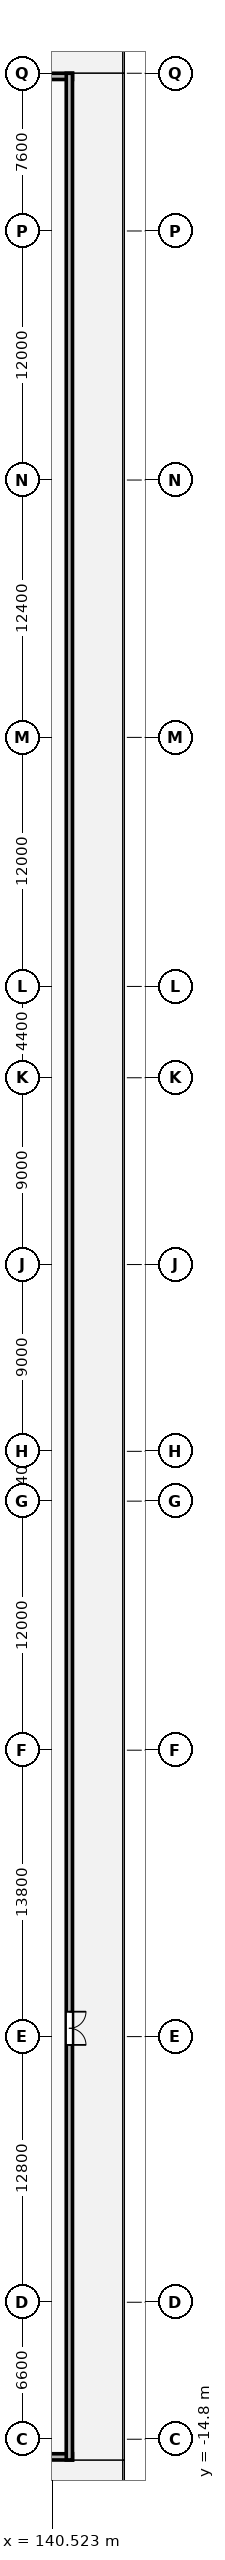
"""IFC4 building model, lengths in metres.
Left out: names, types, materials, properties, quantities, classifications, styles, units other than length and angle.
Written with IfcOpenShell. Run it as: python <this file> out.ifc"""

import sys

from ifc_helpers import new_model, si_unit, direction, frame, frame_2d, origin, place, context, subcontext, project, spatial, rectangle, extrude, element, fill, save


model = new_model("IFC4")
c1 = context("Model", 3, precision=1e-05, world=origin(), true_north=direction((0.0, 1.0)))
c2 = subcontext(c1, "Body", "Model", "MODEL_VIEW")
j1 = project(units=[si_unit("LENGTHUNIT", "METRE"), si_unit("PLANEANGLEUNIT", "RADIAN")], contexts=[c1])
p1 = place(None, origin())
s1 = spatial("IfcSite", under=j1, at=p1, CompositionType="ELEMENT")
p2 = place(p1, origin())
s2 = spatial("IfcBuilding", under=s1, at=p2, CompositionType="ELEMENT")
p3 = place(p2, frame((0.0, 0.0, 19.0)))
s3 = spatial("IfcBuildingStorey", under=s2, at=p3, CompositionType="ELEMENT", Elevation=19.0)
p4 = place(p3, frame((110.0, -15.65, 0.0), z_axis=(0.0, 0.0, 1.0), x_axis=(1.0, 0.0, 0.0)))
e1 = element("IfcWall", 1, at=p4, inside=s3, PredefinedType="STANDARD", context=c2, shape_type="SweptSolid", body=[
    extrude(rectangle(XDim=31.5, YDim=0.3, at=frame_2d((15.75, 0.0))), origin(), (0.0, 0.0, 1.0), 4.68),
])
p5 = place(p3, frame((141.5, 99.05, 0.0), z_axis=(0.0, 0.0, 1.0), x_axis=(-1.0, 0.0, 0.0)))
e2 = element("IfcWall", 2, at=p5, inside=s3, PredefinedType="STANDARD", context=c2, shape_type="SweptSolid", body=[
    extrude(rectangle(XDim=33.5, YDim=0.3, at=frame_2d((16.75, 0.0))), origin(), (0.0, 0.0, 1.0), 4.68),
])
p6 = place(p5, frame((10.0, 0.0, 0.0)))
e3 = element("IfcOpeningElement", 3, at=p6, cuts=e2, PredefinedType="OPENING", context=c2, shape_type="SweptSolid", body=[
    extrude(rectangle(XDim=1.6, YDim=2.2, at=frame_2d((0.8, 1.1))), frame((0.0, 0.16, 0.0), z_axis=(0.0, -1.0, 0.0), x_axis=(1.0, 0.0, 0.0)), (0.0, 0.0, 1.0), 0.32),
])
p7 = place(p3, frame((141.35, -15.8, 0.0), z_axis=(0.0, 0.0, 1.0), x_axis=(0.0, 1.0, 0.0)))
e4 = element("IfcWall", 4, at=p7, inside=s3, PredefinedType="STANDARD", context=c2, shape_type="SweptSolid", body=[
    extrude(rectangle(XDim=115.0, YDim=0.3, at=frame_2d((57.5, 0.0))), origin(), (0.0, 0.0, 1.0), 4.68),
])
p8 = place(p7, frame((20.0, 0.0, 0.0)))
e5 = element("IfcOpeningElement", 5, at=p8, cuts=e4, PredefinedType="OPENING", context=c2, shape_type="SweptSolid", body=[
    extrude(rectangle(XDim=1.6, YDim=2.2, at=frame_2d((0.8, 1.1))), frame((0.0, 0.16, 0.0), z_axis=(0.0, -1.0, 0.0), x_axis=(1.0, 0.0, 0.0)), (0.0, 0.0, 1.0), 0.32),
])
p9 = place(p8, frame((1.6, 0.0, 0.0), z_axis=(0.0, 0.0, 1.0), x_axis=(-1.0, 0.0, 0.0)))
e6 = element("IfcDoor", 6, at=p9, inside=s3, OperationType="DOUBLE_DOOR_SINGLE_SWING", PredefinedType="DOOR", context=c2, shape_type="SweptSolid", body=[
    extrude(rectangle(XDim=1.6, YDim=2.2, at=frame_2d((0.8, 1.1))), frame((0.0, 0.025, 0.0), z_axis=(0.0, -1.0, 0.0), x_axis=(1.0, 0.0, 0.0)), (0.0, 0.0, 1.0), 0.05),
])
fill(e5, e6)
save(model, sys.argv[1])
